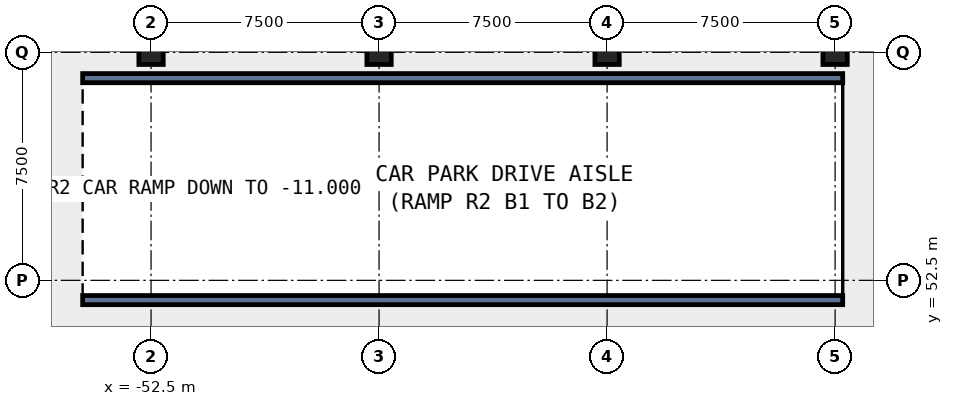
"""IFC4 building model, lengths in metres.
Left out: names, types, materials, properties, quantities, classifications, styles, units other than length and angle.
Written with IfcOpenShell. Run it as: python <this file> out.ifc"""

import sys

from ifc_helpers import new_model, si_unit, direction, frame, frame_2d, origin, origin_2d, place, context, subcontext, project, spatial, rectangle, extrude, element, save


model = new_model("IFC4")
c1 = context("Model", 3, precision=1e-05, world=origin(), true_north=direction((0.0, 1.0)))
c2 = subcontext(c1, "Body", "Model", "MODEL_VIEW")
j1 = project(units=[si_unit("LENGTHUNIT", "METRE"), si_unit("PLANEANGLEUNIT", "RADIAN")], contexts=[c1])
p1 = place(None, origin())
s1 = spatial("IfcSite", under=j1, at=p1, CompositionType="ELEMENT")
p2 = place(p1, origin())
s2 = spatial("IfcBuilding", under=s1, at=p2, CompositionType="ELEMENT")
p3 = place(p2, frame((0.0, 0.0, -5.5)))
s3 = spatial("IfcBuildingStorey", under=s2, at=p3, CompositionType="ELEMENT", Elevation=-5.5)
for number, where, z_axis, x_axis in (
    (1, (-52.5, 60.0, -0.42), (0.0, 0.0, 1.0), (1.0, 0.0, 0.0)),
    (2, (-45.0, 60.0, -0.42), (0.0, 0.0, 1.0), (1.0, 0.0, 0.0)),
    (3, (-37.5, 60.0, -0.42), (0.0, 0.0, 1.0), (1.0, 0.0, 0.0)),
    (4, (-30.0, 60.0, -0.42), (0.0, 0.0, 1.0), (1.0, 0.0, 0.0)),
):
    element("IfcColumn", number, at=place(p3, frame(where, z_axis=z_axis, x_axis=x_axis)), inside=s3, PredefinedType="COLUMN", context=c2, shape_type="SweptSolid", body=[
        extrude(rectangle(XDim=0.8, YDim=0.8, at=origin_2d()), origin(), (0.0, 0.0, 1.0), 5.72),
    ])
for number, where, z_axis, x_axis in (
    (5, (-54.75, 51.85, 0.0), (0.0, 0.0, 1.0), (1.0, 0.0, 0.0)),
    (6, (-54.75, 59.15, 0.0), (0.0, 0.0, 1.0), (1.0, 0.0, 0.0)),
):
    element("IfcWall", number, at=place(p3, frame(where, z_axis=z_axis, x_axis=x_axis)), inside=s3, PredefinedType="SOLIDWALL", context=c2, shape_type="SweptSolid", body=[
        extrude(rectangle(XDim=25.0, YDim=0.3, at=frame_2d((12.5, 0.0))), origin(), (0.0, 0.0, 1.0), 1.1),
    ])
save(model, sys.argv[1])
